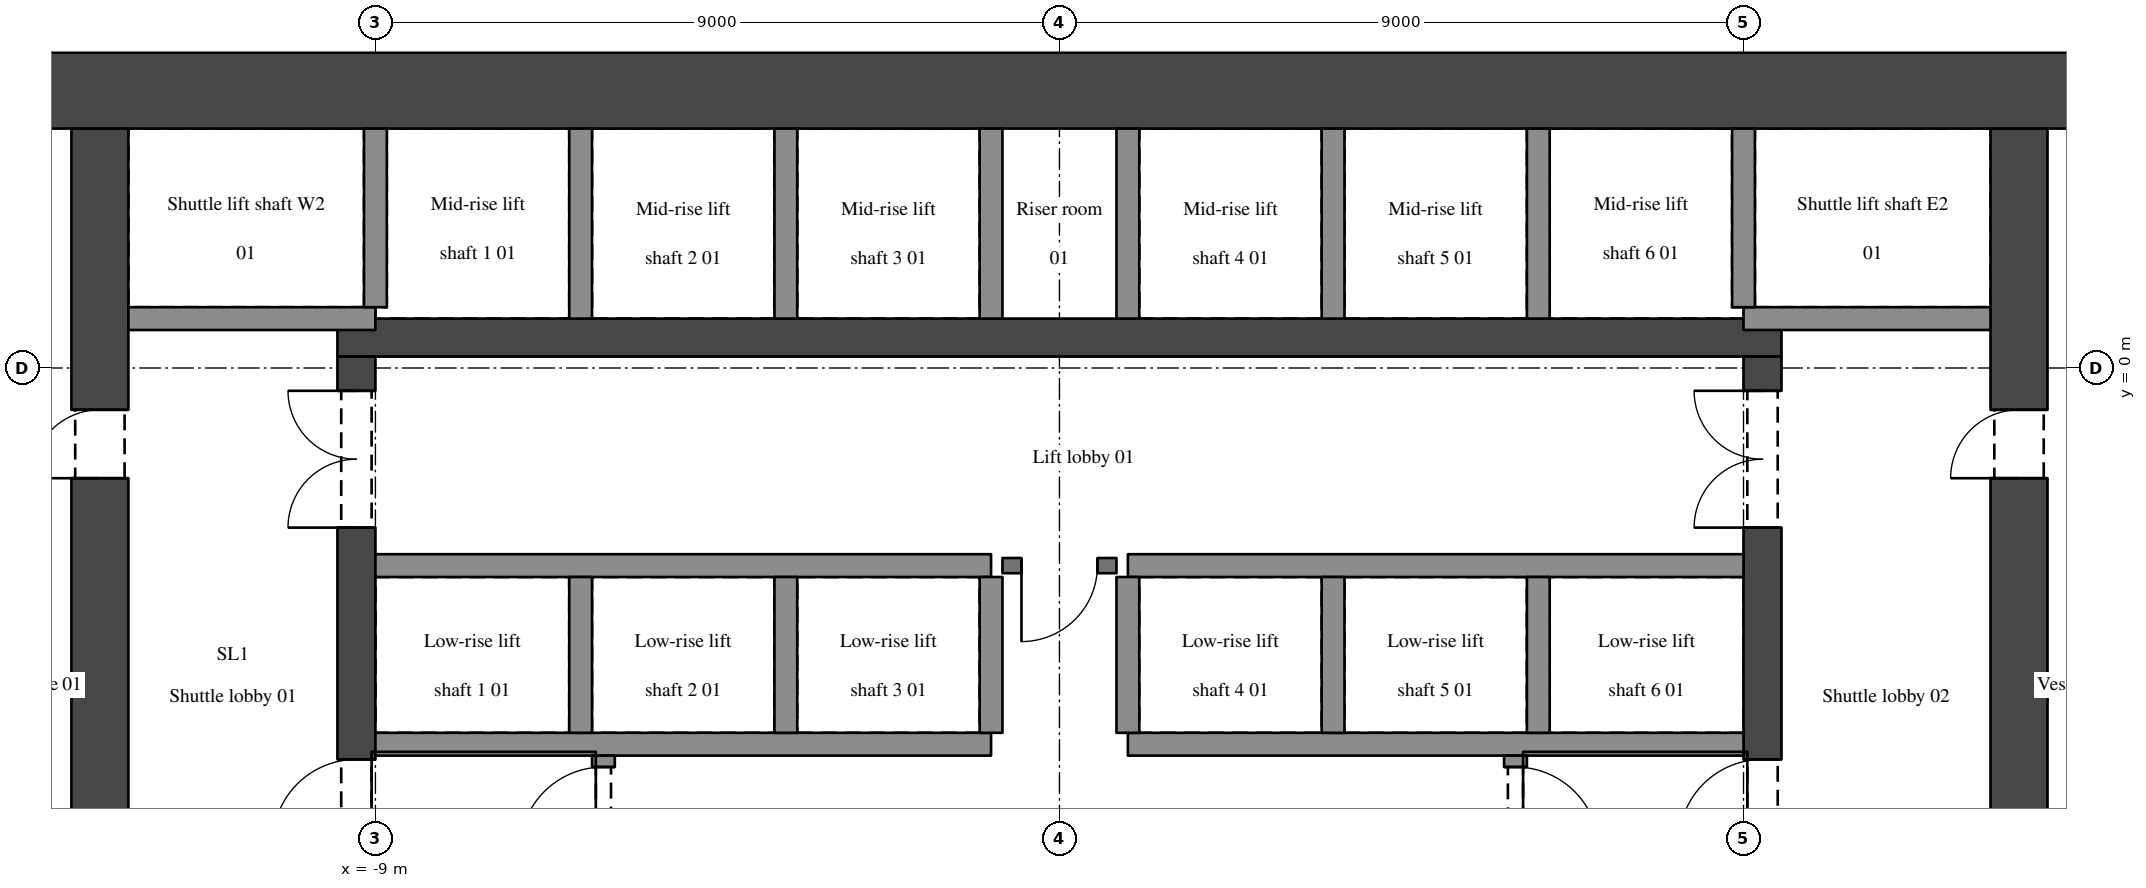
"""IFC4 building model, lengths in metres.
Left out: names, types, materials, properties, quantities, classifications, styles, units other than length and angle.
Written with IfcOpenShell. Run it as: python <this file> out.ifc"""

import sys

from ifc_helpers import new_model, si_unit, direction, frame, frame_2d, origin, place, context, subcontext, project, spatial, rectangle, extrude, element, fill, save


model = new_model("IFC4")
c1 = context("Model", 3, precision=1e-05, world=origin(), true_north=direction((0.0, 1.0)))
c2 = subcontext(c1, "Body", "Model", "MODEL_VIEW")
j1 = project(units=[si_unit("LENGTHUNIT", "METRE"), si_unit("PLANEANGLEUNIT", "RADIAN")], contexts=[c1])
p1 = place(None, origin())
s1 = spatial("IfcSite", under=j1, at=p1, CompositionType="ELEMENT")
p2 = place(p1, origin())
s2 = spatial("IfcBuilding", under=s1, at=p2, CompositionType="ELEMENT")
p3 = place(p2, frame((0.0, 0.0, 114.3)))
s3 = spatial("IfcBuildingStorey", under=s2, at=p3, CompositionType="ELEMENT", Elevation=114.3)
p4 = place(p3, frame((-15.0, 3.65, 0.0), z_axis=(0.0, 0.0, 1.0), x_axis=(1.0, 0.0, 0.0)))
e1 = element("IfcWall", 1, at=p4, inside=s3, PredefinedType="SHEAR", context=c2, shape_type="SweptSolid", body=[
    extrude(rectangle(XDim=30.0, YDim=1.0, at=frame_2d((15.0, 0.0))), origin(), (0.0, 0.0, 1.0), 7.2),
])
p5 = place(p3, frame((-12.625, -11.5, 0.0), z_axis=(0.0, 0.0, 1.0), x_axis=(0.0, 1.0, 0.0)))
e2 = element("IfcWall", 2, at=p5, inside=s3, PredefinedType="SHEAR", context=c2, shape_type="SweptSolid", body=[
    extrude(rectangle(XDim=14.65, YDim=0.75, at=frame_2d((7.325, 0.0))), origin(), (0.0, 0.0, 1.0), 7.2),
])
p6 = place(p5, frame((10.05, 0.0, 0.0)))
e3 = element("IfcOpeningElement", 3, at=p6, cuts=e2, PredefinedType="OPENING", context=c2, shape_type="SweptSolid", body=[
    extrude(rectangle(XDim=0.9, YDim=2.1, at=frame_2d((0.45, 1.05))), frame((0.0, 0.385, 0.0), z_axis=(0.0, -1.0, 0.0), x_axis=(1.0, 0.0, 0.0)), (0.0, 0.0, 1.0), 0.77),
])
p7 = place(p3, frame((12.625, -11.5, 0.0), z_axis=(0.0, 0.0, 1.0), x_axis=(0.0, 1.0, 0.0)))
e4 = element("IfcWall", 4, at=p7, inside=s3, PredefinedType="SHEAR", context=c2, shape_type="SweptSolid", body=[
    extrude(rectangle(XDim=14.65, YDim=0.75, at=frame_2d((7.325, 0.0))), origin(), (0.0, 0.0, 1.0), 7.2),
])
p8 = place(p7, frame((10.05, 0.0, 0.0)))
e5 = element("IfcOpeningElement", 5, at=p8, cuts=e4, PredefinedType="OPENING", context=c2, shape_type="SweptSolid", body=[
    extrude(rectangle(XDim=0.9, YDim=2.1, at=frame_2d((0.45, 1.05))), frame((0.0, 0.385, 0.0), z_axis=(0.0, -1.0, 0.0), x_axis=(1.0, 0.0, 0.0)), (0.0, 0.0, 1.0), 0.77),
])
p9 = place(p3, frame((-9.5, 0.4, 0.0), z_axis=(0.0, 0.0, 1.0), x_axis=(1.0, 0.0, 0.0)))
e6 = element("IfcWall", 6, at=p9, inside=s3, PredefinedType="SHEAR", context=c2, shape_type="SweptSolid", body=[
    extrude(rectangle(XDim=19.0, YDim=0.5, at=frame_2d((9.5, 0.0))), origin(), (0.0, 0.0, 1.0), 7.2),
])
p10 = place(p3, frame((-9.25, -11.5, 0.0), z_axis=(0.0, 0.0, 1.0), x_axis=(0.0, 1.0, 0.0)))
e7 = element("IfcWall", 7, at=p10, inside=s3, PredefinedType="SHEAR", context=c2, shape_type="SweptSolid", body=[
    extrude(rectangle(XDim=11.65, YDim=0.5, at=frame_2d((5.825, 0.0))), origin(), (0.0, 0.0, 1.0), 7.2),
])
p11 = place(p10, frame((9.4, 0.0, 0.0)))
e8 = element("IfcOpeningElement", 8, at=p11, cuts=e7, PredefinedType="OPENING", context=c2, shape_type="SweptSolid", body=[
    extrude(rectangle(XDim=1.8, YDim=2.1, at=frame_2d((0.9, 1.05))), frame((0.0, 0.26, 0.0), z_axis=(0.0, -1.0, 0.0), x_axis=(1.0, 0.0, 0.0)), (0.0, 0.0, 1.0), 0.52),
])
p12 = place(p10, frame((5.25, 0.0, 0.0)))
e9 = element("IfcOpeningElement", 9, at=p12, cuts=e7, PredefinedType="OPENING", context=c2, shape_type="SweptSolid", body=[
    extrude(rectangle(XDim=1.1, YDim=2.1, at=frame_2d((0.55, 1.05))), frame((0.0, 0.26, 0.0), z_axis=(0.0, -1.0, 0.0), x_axis=(1.0, 0.0, 0.0)), (0.0, 0.0, 1.0), 0.52),
])
p13 = place(p3, frame((9.25, -11.5, 0.0), z_axis=(0.0, 0.0, 1.0), x_axis=(0.0, 1.0, 0.0)))
e10 = element("IfcWall", 10, at=p13, inside=s3, PredefinedType="SHEAR", context=c2, shape_type="SweptSolid", body=[
    extrude(rectangle(XDim=11.65, YDim=0.5, at=frame_2d((5.825, 0.0))), origin(), (0.0, 0.0, 1.0), 7.2),
])
p14 = place(p13, frame((9.4, 0.0, 0.0)))
e11 = element("IfcOpeningElement", 11, at=p14, cuts=e10, PredefinedType="OPENING", context=c2, shape_type="SweptSolid", body=[
    extrude(rectangle(XDim=1.8, YDim=2.1, at=frame_2d((0.9, 1.05))), frame((0.0, 0.26, 0.0), z_axis=(0.0, -1.0, 0.0), x_axis=(1.0, 0.0, 0.0)), (0.0, 0.0, 1.0), 0.52),
])
p15 = place(p13, frame((5.25, 0.0, 0.0)))
e12 = element("IfcOpeningElement", 12, at=p15, cuts=e10, PredefinedType="OPENING", context=c2, shape_type="SweptSolid", body=[
    extrude(rectangle(XDim=1.1, YDim=2.1, at=frame_2d((0.55, 1.05))), frame((0.0, 0.26, 0.0), z_axis=(0.0, -1.0, 0.0), x_axis=(1.0, 0.0, 0.0)), (0.0, 0.0, 1.0), 0.52),
])
for number, where, z_axis, x_axis in (
    (13, (-9.0, -4.95, 0.0), (0.0, 0.0, 1.0), (1.0, 0.0, 0.0)),
    (14, (0.9, -4.95, 0.0), (0.0, 0.0, 1.0), (1.0, 0.0, 0.0)),
    (15, (-9.0, -2.6, 0.0), (0.0, 0.0, 1.0), (1.0, 0.0, 0.0)),
):
    element("IfcWall", number, at=place(p3, frame(where, z_axis=z_axis, x_axis=x_axis)), inside=s3, PredefinedType="SHEAR", context=c2, shape_type="SweptSolid", body=[
        extrude(rectangle(XDim=8.1, YDim=0.3, at=frame_2d((4.05, 0.0))), origin(), (0.0, 0.0, 1.0), 7.2),
    ])
p16 = place(p3, frame((0.75, -2.6, 0.0), z_axis=(0.0, 0.0, 1.0), x_axis=(-1.0, 0.0, 0.0)))
e16 = element("IfcWall", 16, at=p16, inside=s3, PredefinedType="SOLIDWALL", context=c2, shape_type="SweptSolid", body=[
    extrude(rectangle(XDim=1.5, YDim=0.2, at=frame_2d((0.75, 0.0))), origin(), (0.0, 0.0, 1.0), 6.9),
])
p17 = place(p16, frame((0.25, 0.0, 0.0)))
e17 = element("IfcOpeningElement", 17, at=p17, cuts=e16, PredefinedType="OPENING", context=c2, shape_type="SweptSolid", body=[
    extrude(rectangle(XDim=1.0, YDim=2.1, at=frame_2d((0.5, 1.05))), frame((0.0, 0.11, 0.0), z_axis=(0.0, -1.0, 0.0), x_axis=(1.0, 0.0, 0.0)), (0.0, 0.0, 1.0), 0.22),
])
p18 = place(p3, frame((0.9, -2.6, 0.0), z_axis=(0.0, 0.0, 1.0), x_axis=(1.0, 0.0, 0.0)))
e18 = element("IfcWall", 18, at=p18, inside=s3, PredefinedType="SHEAR", context=c2, shape_type="SweptSolid", body=[
    extrude(rectangle(XDim=8.1, YDim=0.3, at=frame_2d((4.05, 0.0))), origin(), (0.0, 0.0, 1.0), 7.2),
])
for number, where, z_axis, x_axis in (
    (19, (-9.0, 0.65, 0.0), (0.0, 0.0, 1.0), (-1.0, 0.0, 0.0)),
    (20, (12.25, 0.65, 0.0), (0.0, 0.0, 1.0), (-1.0, 0.0, 0.0)),
):
    element("IfcWall", number, at=place(p3, frame(where, z_axis=z_axis, x_axis=x_axis)), inside=s3, PredefinedType="SHEAR", context=c2, shape_type="SweptSolid", body=[
        extrude(rectangle(XDim=3.25, YDim=0.3, at=frame_2d((1.625, 0.0))), origin(), (0.0, 0.0, 1.0), 7.2),
    ])
p19 = place(p3, frame((-9.0, 0.8, 0.0), z_axis=(0.0, 0.0, 1.0), x_axis=(0.0, 1.0, 0.0)))
e21 = element("IfcWall", 21, at=p19, inside=s3, PredefinedType="SHEAR", context=c2, shape_type="SweptSolid", body=[
    extrude(rectangle(XDim=2.35, YDim=0.3, at=frame_2d((1.175, 0.0))), origin(), (0.0, 0.0, 1.0), 7.2),
])
p20 = place(p3, frame((-6.3, -4.8, 0.0), z_axis=(0.0, 0.0, 1.0), x_axis=(0.0, 1.0, 0.0)))
e22 = element("IfcWall", 22, at=p20, inside=s3, PredefinedType="SHEAR", context=c2, shape_type="SweptSolid", body=[
    extrude(rectangle(XDim=2.05, YDim=0.3, at=frame_2d((1.025, 0.0))), origin(), (0.0, 0.0, 1.0), 7.2),
])
p21 = place(p3, frame((-6.3, 0.65, 0.0), z_axis=(0.0, 0.0, 1.0), x_axis=(0.0, 1.0, 0.0)))
e23 = element("IfcWall", 23, at=p21, inside=s3, PredefinedType="SHEAR", context=c2, shape_type="SweptSolid", body=[
    extrude(rectangle(XDim=2.5, YDim=0.3, at=frame_2d((1.25, 0.0))), origin(), (0.0, 0.0, 1.0), 7.2),
])
p22 = place(p3, frame((-6.0, -11.5, 0.0), z_axis=(0.0, 0.0, 1.0), x_axis=(0.0, 1.0, 0.0)))
e24 = element("IfcWall", 24, at=p22, inside=s3, PredefinedType="SHEAR", context=c2, shape_type="SweptSolid", body=[
    extrude(rectangle(XDim=6.4, YDim=0.3, at=frame_2d((3.2, 0.0))), origin(), (0.0, 0.0, 1.0), 7.2),
])
p23 = place(p22, frame((5.15, 0.0, 0.0)))
e25 = element("IfcOpeningElement", 25, at=p23, cuts=e24, PredefinedType="OPENING", context=c2, shape_type="SweptSolid", body=[
    extrude(rectangle(XDim=1.1, YDim=2.1, at=frame_2d((0.55, 1.05))), frame((0.0, 0.16, 0.0), z_axis=(0.0, -1.0, 0.0), x_axis=(1.0, 0.0, 0.0)), (0.0, 0.0, 1.0), 0.32),
])
p24 = place(p3, frame((-3.6, -4.8, 0.0), z_axis=(0.0, 0.0, 1.0), x_axis=(0.0, 1.0, 0.0)))
e26 = element("IfcWall", 26, at=p24, inside=s3, PredefinedType="SHEAR", context=c2, shape_type="SweptSolid", body=[
    extrude(rectangle(XDim=2.05, YDim=0.3, at=frame_2d((1.025, 0.0))), origin(), (0.0, 0.0, 1.0), 7.2),
])
p25 = place(p3, frame((-3.6, 0.65, 0.0), z_axis=(0.0, 0.0, 1.0), x_axis=(0.0, 1.0, 0.0)))
e27 = element("IfcWall", 27, at=p25, inside=s3, PredefinedType="SHEAR", context=c2, shape_type="SweptSolid", body=[
    extrude(rectangle(XDim=2.5, YDim=0.3, at=frame_2d((1.25, 0.0))), origin(), (0.0, 0.0, 1.0), 7.2),
])
p26 = place(p3, frame((-0.9, -4.8, 0.0), z_axis=(0.0, 0.0, 1.0), x_axis=(0.0, 1.0, 0.0)))
e28 = element("IfcWall", 28, at=p26, inside=s3, PredefinedType="SHEAR", context=c2, shape_type="SweptSolid", body=[
    extrude(rectangle(XDim=2.05, YDim=0.3, at=frame_2d((1.025, 0.0))), origin(), (0.0, 0.0, 1.0), 7.2),
])
p27 = place(p3, frame((-0.9, 0.65, 0.0), z_axis=(0.0, 0.0, 1.0), x_axis=(0.0, 1.0, 0.0)))
e29 = element("IfcWall", 29, at=p27, inside=s3, PredefinedType="SHEAR", context=c2, shape_type="SweptSolid", body=[
    extrude(rectangle(XDim=2.5, YDim=0.3, at=frame_2d((1.25, 0.0))), origin(), (0.0, 0.0, 1.0), 7.2),
])
p28 = place(p3, frame((0.9, -4.8, 0.0), z_axis=(0.0, 0.0, 1.0), x_axis=(0.0, 1.0, 0.0)))
e30 = element("IfcWall", 30, at=p28, inside=s3, PredefinedType="SHEAR", context=c2, shape_type="SweptSolid", body=[
    extrude(rectangle(XDim=2.05, YDim=0.3, at=frame_2d((1.025, 0.0))), origin(), (0.0, 0.0, 1.0), 7.2),
])
p29 = place(p3, frame((0.9, 0.65, 0.0), z_axis=(0.0, 0.0, 1.0), x_axis=(0.0, 1.0, 0.0)))
e31 = element("IfcWall", 31, at=p29, inside=s3, PredefinedType="SHEAR", context=c2, shape_type="SweptSolid", body=[
    extrude(rectangle(XDim=2.5, YDim=0.3, at=frame_2d((1.25, 0.0))), origin(), (0.0, 0.0, 1.0), 7.2),
])
p30 = place(p3, frame((3.6, -4.8, 0.0), z_axis=(0.0, 0.0, 1.0), x_axis=(0.0, 1.0, 0.0)))
e32 = element("IfcWall", 32, at=p30, inside=s3, PredefinedType="SHEAR", context=c2, shape_type="SweptSolid", body=[
    extrude(rectangle(XDim=2.05, YDim=0.3, at=frame_2d((1.025, 0.0))), origin(), (0.0, 0.0, 1.0), 7.2),
])
p31 = place(p3, frame((3.6, 0.65, 0.0), z_axis=(0.0, 0.0, 1.0), x_axis=(0.0, 1.0, 0.0)))
e33 = element("IfcWall", 33, at=p31, inside=s3, PredefinedType="SHEAR", context=c2, shape_type="SweptSolid", body=[
    extrude(rectangle(XDim=2.5, YDim=0.3, at=frame_2d((1.25, 0.0))), origin(), (0.0, 0.0, 1.0), 7.2),
])
p32 = place(p3, frame((6.0, -5.1, 0.0), z_axis=(0.0, 0.0, 1.0), x_axis=(0.0, -1.0, 0.0)))
e34 = element("IfcWall", 34, at=p32, inside=s3, PredefinedType="SHEAR", context=c2, shape_type="SweptSolid", body=[
    extrude(rectangle(XDim=6.4, YDim=0.3, at=frame_2d((3.2, 0.0))), origin(), (0.0, 0.0, 1.0), 7.2),
])
p33 = place(p32, frame((0.15, 0.0, 0.0)))
e35 = element("IfcOpeningElement", 35, at=p33, cuts=e34, PredefinedType="OPENING", context=c2, shape_type="SweptSolid", body=[
    extrude(rectangle(XDim=1.1, YDim=2.1, at=frame_2d((0.55, 1.05))), frame((0.0, 0.16, 0.0), z_axis=(0.0, -1.0, 0.0), x_axis=(1.0, 0.0, 0.0)), (0.0, 0.0, 1.0), 0.32),
])
p34 = place(p3, frame((6.3, -4.8, 0.0), z_axis=(0.0, 0.0, 1.0), x_axis=(0.0, 1.0, 0.0)))
e36 = element("IfcWall", 36, at=p34, inside=s3, PredefinedType="SHEAR", context=c2, shape_type="SweptSolid", body=[
    extrude(rectangle(XDim=2.05, YDim=0.3, at=frame_2d((1.025, 0.0))), origin(), (0.0, 0.0, 1.0), 7.2),
])
p35 = place(p3, frame((6.3, 0.65, 0.0), z_axis=(0.0, 0.0, 1.0), x_axis=(0.0, 1.0, 0.0)))
e37 = element("IfcWall", 37, at=p35, inside=s3, PredefinedType="SHEAR", context=c2, shape_type="SweptSolid", body=[
    extrude(rectangle(XDim=2.5, YDim=0.3, at=frame_2d((1.25, 0.0))), origin(), (0.0, 0.0, 1.0), 7.2),
])
p36 = place(p3, frame((9.0, 0.8, 0.0), z_axis=(0.0, 0.0, 1.0), x_axis=(0.0, 1.0, 0.0)))
e38 = element("IfcWall", 38, at=p36, inside=s3, PredefinedType="SHEAR", context=c2, shape_type="SweptSolid", body=[
    extrude(rectangle(XDim=2.35, YDim=0.3, at=frame_2d((1.175, 0.0))), origin(), (0.0, 0.0, 1.0), 7.2),
])
p37 = place(p14, origin())
e39 = element("IfcDoor", 39, at=p37, inside=s3, OperationType="DOUBLE_DOOR_SINGLE_SWING", PredefinedType="DOOR", context=c2, shape_type="SweptSolid", body=[
    extrude(rectangle(XDim=1.8, YDim=2.1, at=frame_2d((0.9, 1.05))), frame((0.0, 0.025, 0.0), z_axis=(0.0, -1.0, 0.0), x_axis=(1.0, 0.0, 0.0)), (0.0, 0.0, 1.0), 0.05),
])
fill(e11, e39)
p38 = place(p11, origin())
e40 = element("IfcDoor", 40, at=p38, inside=s3, OperationType="DOUBLE_DOOR_SINGLE_SWING", PredefinedType="DOOR", context=c2, shape_type="SweptSolid", body=[
    extrude(rectangle(XDim=1.8, YDim=2.1, at=frame_2d((0.9, 1.05))), frame((0.0, 0.025, 0.0), z_axis=(0.0, -1.0, 0.0), x_axis=(1.0, 0.0, 0.0)), (0.0, 0.0, 1.0), 0.05),
])
fill(e8, e40)
p39 = place(p17, origin())
e41 = element("IfcDoor", 41, at=p39, inside=s3, OperationType="SINGLE_SWING_RIGHT", PredefinedType="DOOR", context=c2, shape_type="SweptSolid", body=[
    extrude(rectangle(XDim=1.0, YDim=2.1, at=frame_2d((0.5, 1.05))), frame((0.0, 0.025, 0.0), z_axis=(0.0, -1.0, 0.0), x_axis=(1.0, 0.0, 0.0)), (0.0, 0.0, 1.0), 0.05),
])
fill(e17, e41)
p40 = place(p23, origin())
e42 = element("IfcDoor", 42, at=p40, inside=s3, OperationType="SINGLE_SWING_LEFT", PredefinedType="DOOR", context=c2, shape_type="SweptSolid", body=[
    extrude(rectangle(XDim=1.1, YDim=2.1, at=frame_2d((0.55, 1.05))), frame((0.0, 0.025, 0.0), z_axis=(0.0, -1.0, 0.0), x_axis=(1.0, 0.0, 0.0)), (0.0, 0.0, 1.0), 0.05),
])
fill(e25, e42)
p41 = place(p12, origin())
e43 = element("IfcDoor", 43, at=p41, inside=s3, OperationType="SINGLE_SWING_LEFT", PredefinedType="DOOR", context=c2, shape_type="SweptSolid", body=[
    extrude(rectangle(XDim=1.1, YDim=2.1, at=frame_2d((0.55, 1.05))), frame((0.0, 0.025, 0.0), z_axis=(0.0, -1.0, 0.0), x_axis=(1.0, 0.0, 0.0)), (0.0, 0.0, 1.0), 0.05),
])
fill(e9, e43)
p42 = place(p33, origin())
e44 = element("IfcDoor", 44, at=p42, inside=s3, OperationType="SINGLE_SWING_RIGHT", PredefinedType="DOOR", context=c2, shape_type="SweptSolid", body=[
    extrude(rectangle(XDim=1.1, YDim=2.1, at=frame_2d((0.55, 1.05))), frame((0.0, 0.025, 0.0), z_axis=(0.0, -1.0, 0.0), x_axis=(1.0, 0.0, 0.0)), (0.0, 0.0, 1.0), 0.05),
])
fill(e35, e44)
p43 = place(p15, origin())
e45 = element("IfcDoor", 45, at=p43, inside=s3, OperationType="SINGLE_SWING_LEFT", PredefinedType="DOOR", context=c2, shape_type="SweptSolid", body=[
    extrude(rectangle(XDim=1.1, YDim=2.1, at=frame_2d((0.55, 1.05))), frame((0.0, 0.025, 0.0), z_axis=(0.0, -1.0, 0.0), x_axis=(1.0, 0.0, 0.0)), (0.0, 0.0, 1.0), 0.05),
])
fill(e12, e45)
p44 = place(p8, origin())
e46 = element("IfcDoor", 46, at=p44, inside=s3, OperationType="SINGLE_SWING_LEFT", PredefinedType="DOOR", context=c2, shape_type="SweptSolid", body=[
    extrude(rectangle(XDim=0.9, YDim=2.1, at=frame_2d((0.45, 1.05))), frame((0.0, 0.025, 0.0), z_axis=(0.0, -1.0, 0.0), x_axis=(1.0, 0.0, 0.0)), (0.0, 0.0, 1.0), 0.05),
])
fill(e5, e46)
p45 = place(p6, origin())
e47 = element("IfcDoor", 47, at=p45, inside=s3, OperationType="SINGLE_SWING_LEFT", PredefinedType="DOOR", context=c2, shape_type="SweptSolid", body=[
    extrude(rectangle(XDim=0.9, YDim=2.1, at=frame_2d((0.45, 1.05))), frame((0.0, 0.025, 0.0), z_axis=(0.0, -1.0, 0.0), x_axis=(1.0, 0.0, 0.0)), (0.0, 0.0, 1.0), 0.05),
])
fill(e3, e47)
save(model, sys.argv[1])
